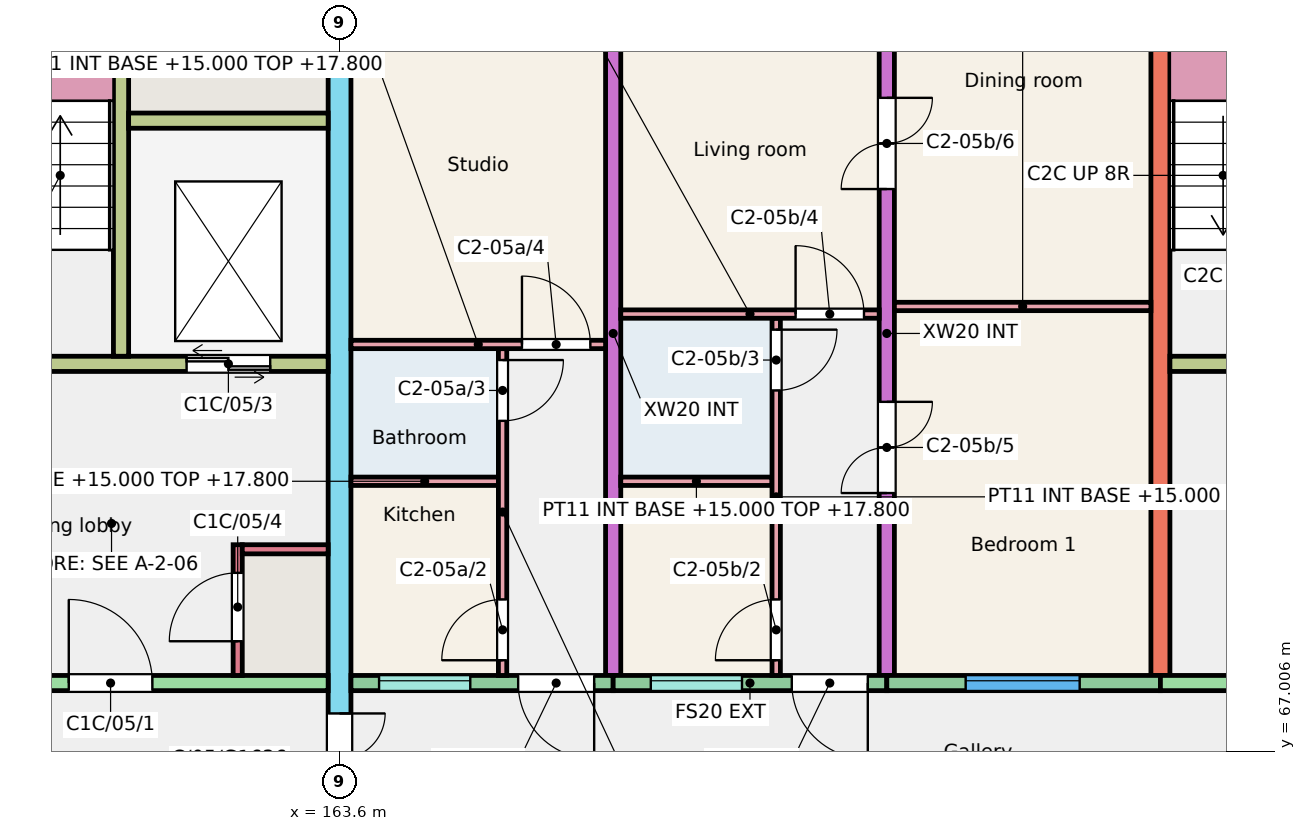
"""IFC4 building model, lengths in metres.
Left out: names, types, materials, properties, quantities, classifications, styles, units other than length and angle.
Written with IfcOpenShell. Run it as: python <this file> out.ifc"""

import sys

from ifc_helpers import new_model, si_unit, direction, frame, frame_2d, origin, place, context, subcontext, project, spatial, rectangle, extrude, element, fill, save


model = new_model("IFC4")
c1 = context("Model", 3, precision=1e-05, world=origin(), true_north=direction((0.0, 1.0)))
c2 = subcontext(c1, "Body", "Model", "MODEL_VIEW")
j1 = project(units=[si_unit("LENGTHUNIT", "METRE"), si_unit("PLANEANGLEUNIT", "RADIAN")], contexts=[c1])
p1 = place(None, origin())
s1 = spatial("IfcSite", under=j1, at=p1, CompositionType="ELEMENT")
p2 = place(p1, origin())
s2 = spatial("IfcBuilding", under=s1, at=p2, CompositionType="ELEMENT")
p3 = place(p2, frame((0.0, 0.0, 15.0)))
s3 = spatial("IfcBuildingStorey", under=s2, at=p3, CompositionType="ELEMENT", Elevation=15.0)
p4 = place(p3, frame((163.6, 66.0, 0.0), z_axis=(0.0, 0.0, 1.0), x_axis=(0.0, 1.0, 0.0)))
e1 = element("IfcWall", 1, at=p4, inside=s3, PredefinedType="SHEAR", context=c2, shape_type="SweptSolid", body=[
    extrude(rectangle(XDim=11.0, YDim=0.3, at=frame_2d((5.5, 0.0))), origin(), (0.0, 0.0, 1.0), 3.0),
])
p5 = place(p4, frame((0.3, 0.0, 0.0)))
e2 = element("IfcOpeningElement", 2, at=p5, cuts=e1, PredefinedType="OPENING", context=c2, shape_type="SweptSolid", body=[
    extrude(rectangle(XDim=1.2, YDim=2.1, at=frame_2d((0.6, 1.05))), frame((0.0, 0.16, 0.0), z_axis=(0.0, -1.0, 0.0), x_axis=(1.0, 0.0, 0.0)), (0.0, 0.0, 1.0), 0.32),
])
p6 = place(p3, frame((167.2, 68.0, 0.0), z_axis=(0.0, 0.0, 1.0), x_axis=(0.0, 1.0, 0.0)))
e3 = element("IfcWall", 3, at=p6, inside=s3, PredefinedType="SHEAR", context=c2, shape_type="SweptSolid", body=[
    extrude(rectangle(XDim=9.0, YDim=0.2, at=frame_2d((4.5, 0.0))), origin(), (0.0, 0.0, 1.0), 3.0),
])
p7 = place(p3, frame((170.8, 68.0, 0.0), z_axis=(0.0, 0.0, 1.0), x_axis=(0.0, 1.0, 0.0)))
e4 = element("IfcWall", 4, at=p7, inside=s3, PredefinedType="SHEAR", context=c2, shape_type="SweptSolid", body=[
    extrude(rectangle(XDim=9.0, YDim=0.2, at=frame_2d((4.5, 0.0))), origin(), (0.0, 0.0, 1.0), 3.0),
])
p8 = place(p7, frame((2.4, 0.0, 0.0)))
e5 = element("IfcOpeningElement", 5, at=p8, cuts=e4, PredefinedType="OPENING", context=c2, shape_type="SweptSolid", body=[
    extrude(rectangle(XDim=1.2, YDim=2.1, at=frame_2d((0.6, 1.05))), frame((0.0, 0.11, 0.0), z_axis=(0.0, -1.0, 0.0), x_axis=(1.0, 0.0, 0.0)), (0.0, 0.0, 1.0), 0.22),
])
p9 = place(p7, frame((6.4, 0.0, 0.0)))
e6 = element("IfcOpeningElement", 6, at=p9, cuts=e4, PredefinedType="OPENING", context=c2, shape_type="SweptSolid", body=[
    extrude(rectangle(XDim=1.2, YDim=2.1, at=frame_2d((0.6, 1.05))), frame((0.0, 0.11, 0.0), z_axis=(0.0, -1.0, 0.0), x_axis=(1.0, 0.0, 0.0)), (0.0, 0.0, 1.0), 0.22),
])
p10 = place(p3, frame((174.4, 68.0, 0.0), z_axis=(0.0, 0.0, 1.0), x_axis=(0.0, 1.0, 0.0)))
e7 = element("IfcWall", 7, at=p10, inside=s3, PredefinedType="SHEAR", context=c2, shape_type="SweptSolid", body=[
    extrude(rectangle(XDim=9.0, YDim=0.25, at=frame_2d((4.5, 0.0))), origin(), (0.0, 0.0, 1.0), 3.0),
])
p11 = place(p3, frame((157.6, 67.9, 0.0), z_axis=(0.0, 0.0, 1.0), x_axis=(1.0, 0.0, 0.0)))
e8 = element("IfcWall", 8, at=p11, inside=s3, PredefinedType="SHEAR", context=c2, shape_type="SweptSolid", body=[
    extrude(rectangle(XDim=5.85, YDim=0.2, at=frame_2d((2.925, 0.0))), origin(), (0.0, 0.0, 1.0), 3.0),
])
p12 = place(p11, frame((2.438, 0.0, 0.0)))
e9 = element("IfcOpeningElement", 9, at=p12, cuts=e8, PredefinedType="OPENING", context=c2, shape_type="SweptSolid", body=[
    extrude(rectangle(XDim=1.1, YDim=2.1, at=frame_2d((0.55, 1.05))), frame((0.0, 0.11, 0.0), z_axis=(0.0, -1.0, 0.0), x_axis=(1.0, 0.0, 0.0)), (0.0, 0.0, 1.0), 0.22),
])
p13 = place(p3, frame((157.725, 72.1, 0.0), z_axis=(0.0, 0.0, 1.0), x_axis=(1.0, 0.0, 0.0)))
e10 = element("IfcWall", 10, at=p13, inside=s3, PredefinedType="SHEAR", context=c2, shape_type="SweptSolid", body=[
    extrude(rectangle(XDim=5.725, YDim=0.2, at=frame_2d((2.862, 0.0))), origin(), (0.0, 0.0, 1.0), 3.0),
])
p14 = place(p13, frame((0.95, 0.0, 0.0)))
e11 = element("IfcOpeningElement", 11, at=p14, cuts=e10, PredefinedType="OPENING", context=c2, shape_type="SweptSolid", body=[
    extrude(rectangle(XDim=1.0, YDim=2.1, at=frame_2d((0.5, 1.05))), frame((0.0, 0.11, 0.0), z_axis=(0.0, -1.0, 0.0), x_axis=(1.0, 0.0, 0.0)), (0.0, 0.0, 1.0), 0.22),
])
p15 = place(p13, frame((3.863, 0.0, 0.0)))
e12 = element("IfcOpeningElement", 12, at=p15, cuts=e10, PredefinedType="OPENING", context=c2, shape_type="SweptSolid", body=[
    extrude(rectangle(XDim=1.1, YDim=2.1, at=frame_2d((0.55, 1.05))), frame((0.0, 0.11, 0.0), z_axis=(0.0, -1.0, 0.0), x_axis=(1.0, 0.0, 0.0)), (0.0, 0.0, 1.0), 0.22),
])
p16 = place(p3, frame((160.725, 72.2, 0.0), z_axis=(0.0, 0.0, 1.0), x_axis=(0.0, 1.0, 0.0)))
e13 = element("IfcWall", 13, at=p16, inside=s3, PredefinedType="SHEAR", context=c2, shape_type="SweptSolid", body=[
    extrude(rectangle(XDim=4.8, YDim=0.2, at=frame_2d((2.4, 0.0))), origin(), (0.0, 0.0, 1.0), 3.0),
])
p17 = place(p3, frame((160.825, 75.3, 0.0), z_axis=(0.0, 0.0, 1.0), x_axis=(1.0, 0.0, 0.0)))
e14 = element("IfcWall", 14, at=p17, inside=s3, PredefinedType="SHEAR", context=c2, shape_type="SweptSolid", body=[
    extrude(rectangle(XDim=2.625, YDim=0.2, at=frame_2d((1.312, 0.0))), origin(), (0.0, 0.0, 1.0), 3.0),
])
p18 = place(p3, frame((162.26, 68.0, 0.0), z_axis=(0.0, 0.0, 1.0), x_axis=(0.0, 1.0, 0.0)))
e15 = element("IfcWall", 15, at=p18, inside=s3, PredefinedType="SHEAR", context=c2, shape_type="SweptSolid", body=[
    extrude(rectangle(XDim=1.72, YDim=0.12, at=frame_2d((0.86, 0.0))), origin(), (0.0, 0.0, 1.0), 3.0),
])
p19 = place(p18, frame((0.45, 0.0, 0.0)))
e16 = element("IfcOpeningElement", 16, at=p19, cuts=e15, PredefinedType="OPENING", context=c2, shape_type="SweptSolid", body=[
    extrude(rectangle(XDim=0.9, YDim=2.1, at=frame_2d((0.45, 1.05))), frame((0.0, 0.07, 0.0), z_axis=(0.0, -1.0, 0.0), x_axis=(1.0, 0.0, 0.0)), (0.0, 0.0, 1.0), 0.14),
])
p20 = place(p3, frame((162.32, 69.66, 0.0), z_axis=(0.0, 0.0, 1.0), x_axis=(1.0, 0.0, 0.0)))
e17 = element("IfcWall", 17, at=p20, inside=s3, PredefinedType="SHEAR", context=c2, shape_type="SweptSolid", body=[
    extrude(rectangle(XDim=1.13, YDim=0.12, at=frame_2d((0.565, 0.0))), origin(), (0.0, 0.0, 1.0), 3.0),
])
p21 = place(p3, frame((163.75, 67.9, 0.0), z_axis=(0.0, 0.0, 1.0), x_axis=(1.0, 0.0, 0.0)))
e18 = element("IfcWall", 18, at=p21, inside=s3, PredefinedType="SOLIDWALL", context=c2, shape_type="SweptSolid", body=[
    extrude(rectangle(XDim=3.45, YDim=0.2, at=frame_2d((1.725, 0.0))), origin(), (0.0, 0.0, 1.0), 3.0),
])
p22 = place(p21, frame((0.37, 0.0, 1.1)))
e19 = element("IfcOpeningElement", 19, at=p22, cuts=e18, PredefinedType="OPENING", context=c2, shape_type="SweptSolid", body=[
    extrude(rectangle(XDim=1.2, YDim=1.3, at=frame_2d((0.6, 0.65))), frame((0.0, 0.11, 0.0), z_axis=(0.0, -1.0, 0.0), x_axis=(1.0, 0.0, 0.0)), (0.0, 0.0, 1.0), 0.22),
])
p23 = place(p21, frame((2.2, 0.0, 0.0)))
e20 = element("IfcOpeningElement", 20, at=p23, cuts=e18, PredefinedType="OPENING", context=c2, shape_type="SweptSolid", body=[
    extrude(rectangle(XDim=1.0, YDim=2.1, at=frame_2d((0.5, 1.05))), frame((0.0, 0.11, 0.0), z_axis=(0.0, -1.0, 0.0), x_axis=(1.0, 0.0, 0.0)), (0.0, 0.0, 1.0), 0.22),
])
p24 = place(p3, frame((167.2, 67.9, 0.0), z_axis=(0.0, 0.0, 1.0), x_axis=(1.0, 0.0, 0.0)))
e21 = element("IfcWall", 21, at=p24, inside=s3, PredefinedType="SOLIDWALL", context=c2, shape_type="SweptSolid", body=[
    extrude(rectangle(XDim=3.6, YDim=0.2, at=frame_2d((1.8, 0.0))), origin(), (0.0, 0.0, 1.0), 3.0),
])
p25 = place(p24, frame((0.495, 0.0, 1.1)))
e22 = element("IfcOpeningElement", 22, at=p25, cuts=e21, PredefinedType="OPENING", context=c2, shape_type="SweptSolid", body=[
    extrude(rectangle(XDim=1.2, YDim=1.3, at=frame_2d((0.6, 0.65))), frame((0.0, 0.11, 0.0), z_axis=(0.0, -1.0, 0.0), x_axis=(1.0, 0.0, 0.0)), (0.0, 0.0, 1.0), 0.22),
])
p26 = place(p24, frame((2.35, 0.0, 0.0)))
e23 = element("IfcOpeningElement", 23, at=p26, cuts=e21, PredefinedType="OPENING", context=c2, shape_type="SweptSolid", body=[
    extrude(rectangle(XDim=1.0, YDim=2.1, at=frame_2d((0.5, 1.05))), frame((0.0, 0.11, 0.0), z_axis=(0.0, -1.0, 0.0), x_axis=(1.0, 0.0, 0.0)), (0.0, 0.0, 1.0), 0.22),
])
p27 = place(p3, frame((170.8, 67.9, 0.0), z_axis=(0.0, 0.0, 1.0), x_axis=(1.0, 0.0, 0.0)))
e24 = element("IfcWall", 24, at=p27, inside=s3, PredefinedType="SOLIDWALL", context=c2, shape_type="SweptSolid", body=[
    extrude(rectangle(XDim=3.6, YDim=0.2, at=frame_2d((1.8, 0.0))), origin(), (0.0, 0.0, 1.0), 3.0),
])
p28 = place(p27, frame((1.038, 0.0, 0.9)))
e25 = element("IfcOpeningElement", 25, at=p28, cuts=e24, PredefinedType="OPENING", context=c2, shape_type="SweptSolid", body=[
    extrude(rectangle(XDim=1.5, YDim=1.5, at=frame_2d((0.75, 0.75))), frame((0.0, 0.11, 0.0), z_axis=(0.0, -1.0, 0.0), x_axis=(1.0, 0.0, 0.0)), (0.0, 0.0, 1.0), 0.22),
])
p29 = place(p3, frame((174.4, 67.9, 0.0), z_axis=(0.0, 0.0, 1.0), x_axis=(1.0, 0.0, 0.0)))
e26 = element("IfcWall", 26, at=p29, inside=s3, PredefinedType="SHEAR", context=c2, shape_type="SweptSolid", body=[
    extrude(rectangle(XDim=5.85, YDim=0.2, at=frame_2d((2.925, 0.0))), origin(), (0.0, 0.0, 1.0), 3.0),
])
p30 = place(p29, frame((2.438, 0.0, 0.0)))
e27 = element("IfcOpeningElement", 27, at=p30, cuts=e26, PredefinedType="OPENING", context=c2, shape_type="SweptSolid", body=[
    extrude(rectangle(XDim=1.1, YDim=2.1, at=frame_2d((0.55, 1.05))), frame((0.0, 0.11, 0.0), z_axis=(0.0, -1.0, 0.0), x_axis=(1.0, 0.0, 0.0)), (0.0, 0.0, 1.0), 0.22),
])
p31 = place(p3, frame((174.525, 72.1, 0.0), z_axis=(0.0, 0.0, 1.0), x_axis=(1.0, 0.0, 0.0)))
e28 = element("IfcWall", 28, at=p31, inside=s3, PredefinedType="SHEAR", context=c2, shape_type="SweptSolid", body=[
    extrude(rectangle(XDim=5.725, YDim=0.2, at=frame_2d((2.863, 0.0))), origin(), (0.0, 0.0, 1.0), 3.0),
])
p32 = place(p31, frame((0.95, 0.0, 0.0)))
e29 = element("IfcOpeningElement", 29, at=p32, cuts=e28, PredefinedType="OPENING", context=c2, shape_type="SweptSolid", body=[
    extrude(rectangle(XDim=1.0, YDim=2.1, at=frame_2d((0.5, 1.05))), frame((0.0, 0.11, 0.0), z_axis=(0.0, -1.0, 0.0), x_axis=(1.0, 0.0, 0.0)), (0.0, 0.0, 1.0), 0.22),
])
p33 = place(p31, frame((3.863, 0.0, 0.0)))
e30 = element("IfcOpeningElement", 30, at=p33, cuts=e28, PredefinedType="OPENING", context=c2, shape_type="SweptSolid", body=[
    extrude(rectangle(XDim=1.1, YDim=2.1, at=frame_2d((0.55, 1.05))), frame((0.0, 0.11, 0.0), z_axis=(0.0, -1.0, 0.0), x_axis=(1.0, 0.0, 0.0)), (0.0, 0.0, 1.0), 0.22),
])
p34 = place(p3, frame((163.75, 70.555, 0.0), z_axis=(0.0, 0.0, 1.0), x_axis=(1.0, 0.0, 0.0)))
e31 = element("IfcWall", 31, at=p34, inside=s3, PredefinedType="PARTITIONING", context=c2, shape_type="SweptSolid", body=[
    extrude(rectangle(XDim=1.94, YDim=0.11, at=frame_2d((0.97, 0.0))), origin(), (0.0, 0.0, 1.0), 2.8),
])
p35 = place(p3, frame((165.745, 68.0, 0.0), z_axis=(0.0, 0.0, 1.0), x_axis=(0.0, 1.0, 0.0)))
e32 = element("IfcWall", 32, at=p35, inside=s3, PredefinedType="PARTITIONING", context=c2, shape_type="SweptSolid", body=[
    extrude(rectangle(XDim=4.3, YDim=0.11, at=frame_2d((2.15, 0.0))), origin(), (0.0, 0.0, 1.0), 2.8),
])
p36 = place(p35, frame((0.2, 0.0, 0.0)))
e33 = element("IfcOpeningElement", 33, at=p36, cuts=e32, PredefinedType="OPENING", context=c2, shape_type="SweptSolid", body=[
    extrude(rectangle(XDim=0.8, YDim=2.1, at=frame_2d((0.4, 1.05))), frame((0.0, 0.065, 0.0), z_axis=(0.0, -1.0, 0.0), x_axis=(1.0, 0.0, 0.0)), (0.0, 0.0, 1.0), 0.13),
])
p37 = place(p35, frame((3.35, 0.0, 0.0)))
e34 = element("IfcOpeningElement", 34, at=p37, cuts=e32, PredefinedType="OPENING", context=c2, shape_type="SweptSolid", body=[
    extrude(rectangle(XDim=0.8, YDim=2.1, at=frame_2d((0.4, 1.05))), frame((0.0, 0.065, 0.0), z_axis=(0.0, -1.0, 0.0), x_axis=(1.0, 0.0, 0.0)), (0.0, 0.0, 1.0), 0.13),
])
p38 = place(p3, frame((163.75, 72.355, 0.0), z_axis=(0.0, 0.0, 1.0), x_axis=(1.0, 0.0, 0.0)))
e35 = element("IfcWall", 35, at=p38, inside=s3, PredefinedType="PARTITIONING", context=c2, shape_type="SweptSolid", body=[
    extrude(rectangle(XDim=3.35, YDim=0.11, at=frame_2d((1.675, 0.0))), origin(), (0.0, 0.0, 1.0), 2.8),
])
p39 = place(p38, frame((2.25, 0.0, 0.0)))
e36 = element("IfcOpeningElement", 36, at=p39, cuts=e35, PredefinedType="OPENING", context=c2, shape_type="SweptSolid", body=[
    extrude(rectangle(XDim=0.9, YDim=2.1, at=frame_2d((0.45, 1.05))), frame((0.0, 0.065, 0.0), z_axis=(0.0, -1.0, 0.0), x_axis=(1.0, 0.0, 0.0)), (0.0, 0.0, 1.0), 0.13),
])
p40 = place(p3, frame((167.3, 70.555, 0.0), z_axis=(0.0, 0.0, 1.0), x_axis=(1.0, 0.0, 0.0)))
e37 = element("IfcWall", 37, at=p40, inside=s3, PredefinedType="PARTITIONING", context=c2, shape_type="SweptSolid", body=[
    extrude(rectangle(XDim=1.99, YDim=0.11, at=frame_2d((0.995, 0.0))), origin(), (0.0, 0.0, 1.0), 2.8),
])
p41 = place(p3, frame((169.345, 68.0, 0.0), z_axis=(0.0, 0.0, 1.0), x_axis=(0.0, 1.0, 0.0)))
e38 = element("IfcWall", 38, at=p41, inside=s3, PredefinedType="PARTITIONING", context=c2, shape_type="SweptSolid", body=[
    extrude(rectangle(XDim=4.7, YDim=0.11, at=frame_2d((2.35, 0.0))), origin(), (0.0, 0.0, 1.0), 2.8),
])
p42 = place(p41, frame((0.2, 0.0, 0.0)))
e39 = element("IfcOpeningElement", 39, at=p42, cuts=e38, PredefinedType="OPENING", context=c2, shape_type="SweptSolid", body=[
    extrude(rectangle(XDim=0.8, YDim=2.1, at=frame_2d((0.4, 1.05))), frame((0.0, 0.065, 0.0), z_axis=(0.0, -1.0, 0.0), x_axis=(1.0, 0.0, 0.0)), (0.0, 0.0, 1.0), 0.13),
])
p43 = place(p41, frame((3.75, 0.0, 0.0)))
e40 = element("IfcOpeningElement", 40, at=p43, cuts=e38, PredefinedType="OPENING", context=c2, shape_type="SweptSolid", body=[
    extrude(rectangle(XDim=0.8, YDim=2.1, at=frame_2d((0.4, 1.05))), frame((0.0, 0.065, 0.0), z_axis=(0.0, -1.0, 0.0), x_axis=(1.0, 0.0, 0.0)), (0.0, 0.0, 1.0), 0.13),
])
p44 = place(p3, frame((167.3, 72.755, 0.0), z_axis=(0.0, 0.0, 1.0), x_axis=(1.0, 0.0, 0.0)))
e41 = element("IfcWall", 41, at=p44, inside=s3, PredefinedType="PARTITIONING", context=c2, shape_type="SweptSolid", body=[
    extrude(rectangle(XDim=3.4, YDim=0.11, at=frame_2d((1.7, 0.0))), origin(), (0.0, 0.0, 1.0), 2.8),
])
p45 = place(p44, frame((2.3, 0.0, 0.0)))
e42 = element("IfcOpeningElement", 42, at=p45, cuts=e41, PredefinedType="OPENING", context=c2, shape_type="SweptSolid", body=[
    extrude(rectangle(XDim=0.9, YDim=2.1, at=frame_2d((0.45, 1.05))), frame((0.0, 0.065, 0.0), z_axis=(0.0, -1.0, 0.0), x_axis=(1.0, 0.0, 0.0)), (0.0, 0.0, 1.0), 0.13),
])
p46 = place(p3, frame((170.9, 72.855, 0.0), z_axis=(0.0, 0.0, 1.0), x_axis=(1.0, 0.0, 0.0)))
e43 = element("IfcWall", 43, at=p46, inside=s3, PredefinedType="PARTITIONING", context=c2, shape_type="SweptSolid", body=[
    extrude(rectangle(XDim=3.375, YDim=0.11, at=frame_2d((1.688, 0.0))), origin(), (0.0, 0.0, 1.0), 2.8),
])
p47 = place(p22, origin())
e44 = element("IfcWindow", 44, at=p47, inside=s3, PartitioningType="SINGLE_PANEL", PredefinedType="WINDOW", context=c2, shape_type="SweptSolid", body=[
    extrude(rectangle(XDim=1.2, YDim=1.3, at=frame_2d((0.6, 0.65))), frame((0.0, 0.06, 0.0), z_axis=(0.0, -1.0, 0.0), x_axis=(1.0, 0.0, 0.0)), (0.0, 0.0, 1.0), 0.06),
])
fill(e19, e44)
p48 = place(p28, origin())
e45 = element("IfcWindow", 45, at=p48, inside=s3, PartitioningType="SINGLE_PANEL", PredefinedType="WINDOW", context=c2, shape_type="SweptSolid", body=[
    extrude(rectangle(XDim=1.5, YDim=1.5, at=frame_2d((0.75, 0.75))), frame((0.0, 0.06, 0.0), z_axis=(0.0, -1.0, 0.0), x_axis=(1.0, 0.0, 0.0)), (0.0, 0.0, 1.0), 0.06),
])
fill(e25, e45)
p49 = place(p25, origin())
e46 = element("IfcWindow", 46, at=p49, inside=s3, PartitioningType="SINGLE_PANEL", PredefinedType="WINDOW", context=c2, shape_type="SweptSolid", body=[
    extrude(rectangle(XDim=1.2, YDim=1.3, at=frame_2d((0.6, 0.65))), frame((0.0, 0.06, 0.0), z_axis=(0.0, -1.0, 0.0), x_axis=(1.0, 0.0, 0.0)), (0.0, 0.0, 1.0), 0.06),
])
fill(e22, e46)
p50 = place(p23, origin())
e47 = element("IfcDoor", 47, at=p50, inside=s3, OperationType="SINGLE_SWING_RIGHT", PredefinedType="DOOR", context=c2, shape_type="SweptSolid", body=[
    extrude(rectangle(XDim=1.0, YDim=2.1, at=frame_2d((0.5, 1.05))), frame((0.0, 0.025, 0.0), z_axis=(0.0, -1.0, 0.0), x_axis=(1.0, 0.0, 0.0)), (0.0, 0.0, 1.0), 0.05),
])
fill(e20, e47)
p51 = place(p36, origin())
e48 = element("IfcDoor", 48, at=p51, inside=s3, OperationType="SINGLE_SWING_LEFT", PredefinedType="DOOR", context=c2, shape_type="SweptSolid", body=[
    extrude(rectangle(XDim=0.8, YDim=2.1, at=frame_2d((0.4, 1.05))), frame((0.0, 0.025, 0.0), z_axis=(0.0, -1.0, 0.0), x_axis=(1.0, 0.0, 0.0)), (0.0, 0.0, 1.0), 0.05),
])
fill(e33, e48)
p52 = place(p37, origin())
e49 = element("IfcDoor", 49, at=p52, inside=s3, OperationType="SINGLE_SWING_RIGHT", PredefinedType="DOOR", context=c2, shape_type="SweptSolid", body=[
    extrude(rectangle(XDim=0.8, YDim=2.1, at=frame_2d((0.4, 1.05))), frame((0.0, 0.025, 0.0), z_axis=(0.0, -1.0, 0.0), x_axis=(1.0, 0.0, 0.0)), (0.0, 0.0, 1.0), 0.05),
])
fill(e34, e49)
p53 = place(p39, origin())
e50 = element("IfcDoor", 50, at=p53, inside=s3, OperationType="SINGLE_SWING_LEFT", PredefinedType="DOOR", context=c2, shape_type="SweptSolid", body=[
    extrude(rectangle(XDim=0.9, YDim=2.1, at=frame_2d((0.45, 1.05))), frame((0.0, 0.025, 0.0), z_axis=(0.0, -1.0, 0.0), x_axis=(1.0, 0.0, 0.0)), (0.0, 0.0, 1.0), 0.05),
])
fill(e36, e50)
p54 = place(p26, origin())
e51 = element("IfcDoor", 51, at=p54, inside=s3, OperationType="SINGLE_SWING_RIGHT", PredefinedType="DOOR", context=c2, shape_type="SweptSolid", body=[
    extrude(rectangle(XDim=1.0, YDim=2.1, at=frame_2d((0.5, 1.05))), frame((0.0, 0.025, 0.0), z_axis=(0.0, -1.0, 0.0), x_axis=(1.0, 0.0, 0.0)), (0.0, 0.0, 1.0), 0.05),
])
fill(e23, e51)
p55 = place(p42, origin())
e52 = element("IfcDoor", 52, at=p55, inside=s3, OperationType="SINGLE_SWING_LEFT", PredefinedType="DOOR", context=c2, shape_type="SweptSolid", body=[
    extrude(rectangle(XDim=0.8, YDim=2.1, at=frame_2d((0.4, 1.05))), frame((0.0, 0.025, 0.0), z_axis=(0.0, -1.0, 0.0), x_axis=(1.0, 0.0, 0.0)), (0.0, 0.0, 1.0), 0.05),
])
fill(e39, e52)
p56 = place(p43, origin())
e53 = element("IfcDoor", 53, at=p56, inside=s3, OperationType="SINGLE_SWING_RIGHT", PredefinedType="DOOR", context=c2, shape_type="SweptSolid", body=[
    extrude(rectangle(XDim=0.8, YDim=2.1, at=frame_2d((0.4, 1.05))), frame((0.0, 0.025, 0.0), z_axis=(0.0, -1.0, 0.0), x_axis=(1.0, 0.0, 0.0)), (0.0, 0.0, 1.0), 0.05),
])
fill(e40, e53)
p57 = place(p45, origin())
e54 = element("IfcDoor", 54, at=p57, inside=s3, OperationType="SINGLE_SWING_LEFT", PredefinedType="DOOR", context=c2, shape_type="SweptSolid", body=[
    extrude(rectangle(XDim=0.9, YDim=2.1, at=frame_2d((0.45, 1.05))), frame((0.0, 0.025, 0.0), z_axis=(0.0, -1.0, 0.0), x_axis=(1.0, 0.0, 0.0)), (0.0, 0.0, 1.0), 0.05),
])
fill(e42, e54)
p58 = place(p8, origin())
e55 = element("IfcDoor", 55, at=p58, inside=s3, OperationType="DOUBLE_DOOR_SINGLE_SWING", PredefinedType="DOOR", context=c2, shape_type="SweptSolid", body=[
    extrude(rectangle(XDim=1.2, YDim=2.1, at=frame_2d((0.6, 1.05))), frame((0.0, 0.025, 0.0), z_axis=(0.0, -1.0, 0.0), x_axis=(1.0, 0.0, 0.0)), (0.0, 0.0, 1.0), 0.05),
])
fill(e5, e55)
p59 = place(p9, origin())
e56 = element("IfcDoor", 56, at=p59, inside=s3, OperationType="DOUBLE_DOOR_SINGLE_SWING", PredefinedType="DOOR", context=c2, shape_type="SweptSolid", body=[
    extrude(rectangle(XDim=1.2, YDim=2.1, at=frame_2d((0.6, 1.05))), frame((0.0, 0.025, 0.0), z_axis=(0.0, -1.0, 0.0), x_axis=(1.0, 0.0, 0.0)), (0.0, 0.0, 1.0), 0.05),
])
fill(e6, e56)
p60 = place(p12, origin())
e57 = element("IfcDoor", 57, at=p60, inside=s3, OperationType="SINGLE_SWING_LEFT", PredefinedType="DOOR", context=c2, shape_type="SweptSolid", body=[
    extrude(rectangle(XDim=1.1, YDim=2.1, at=frame_2d((0.55, 1.05))), frame((0.0, 0.025, 0.0), z_axis=(0.0, -1.0, 0.0), x_axis=(1.0, 0.0, 0.0)), (0.0, 0.0, 1.0), 0.05),
])
fill(e9, e57)
p61 = place(p15, origin())
e58 = element("IfcDoor", 58, at=p61, inside=s3, OperationType="DOUBLE_DOOR_SLIDING", PredefinedType="DOOR", context=c2, shape_type="SweptSolid", body=[
    extrude(rectangle(XDim=1.1, YDim=2.1, at=frame_2d((0.55, 1.05))), frame((0.0, 0.025, 0.0), z_axis=(0.0, -1.0, 0.0), x_axis=(1.0, 0.0, 0.0)), (0.0, 0.0, 1.0), 0.05),
])
fill(e12, e58)
p62 = place(p19, origin())
e59 = element("IfcDoor", 59, at=p62, inside=s3, OperationType="SINGLE_SWING_LEFT", PredefinedType="DOOR", context=c2, shape_type="SweptSolid", body=[
    extrude(rectangle(XDim=0.9, YDim=2.1, at=frame_2d((0.45, 1.05))), frame((0.0, 0.025, 0.0), z_axis=(0.0, -1.0, 0.0), x_axis=(1.0, 0.0, 0.0)), (0.0, 0.0, 1.0), 0.05),
])
fill(e16, e59)
p63 = place(p5, origin())
e60 = element("IfcDoor", 60, at=p63, inside=s3, OperationType="DOUBLE_DOOR_SINGLE_SWING", PredefinedType="DOOR", context=c2, shape_type="SweptSolid", body=[
    extrude(rectangle(XDim=1.2, YDim=2.1, at=frame_2d((0.6, 1.05))), frame((0.0, 0.025, 0.0), z_axis=(0.0, -1.0, 0.0), x_axis=(1.0, 0.0, 0.0)), (0.0, 0.0, 1.0), 0.05),
])
fill(e2, e60)
save(model, sys.argv[1])
